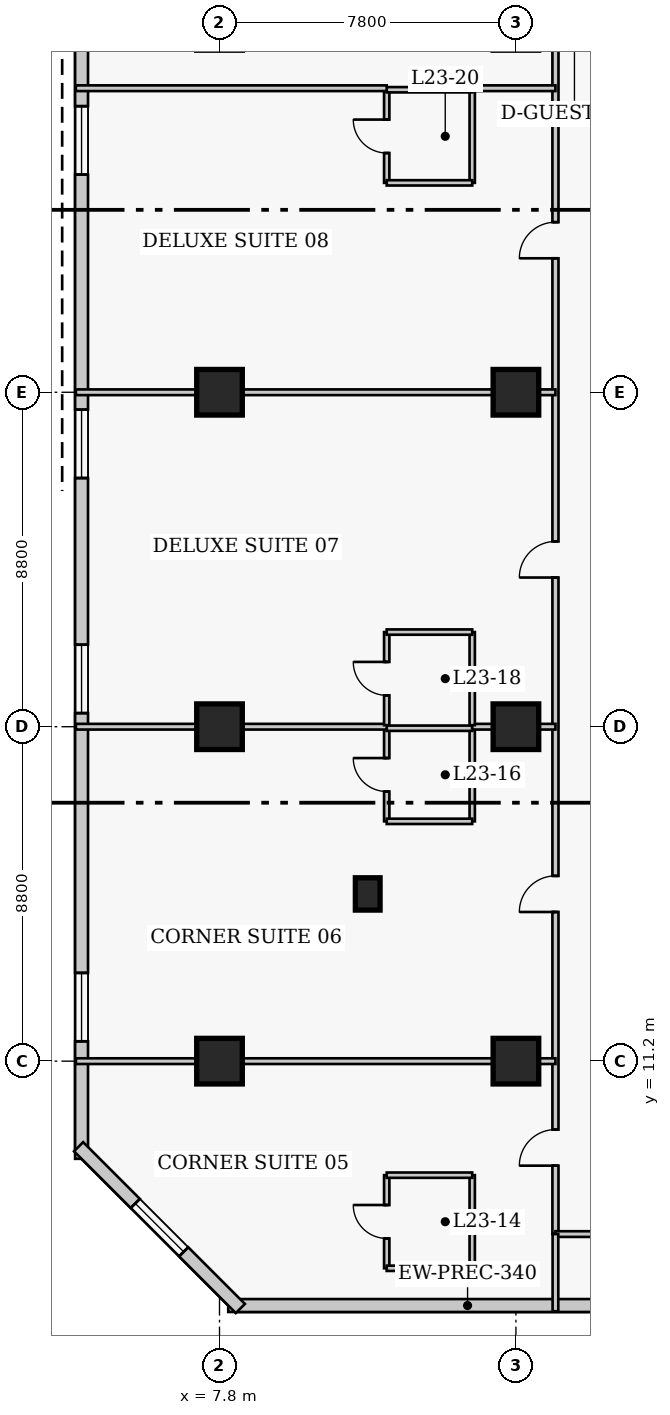
"""IFC4 building model, lengths in metres.
Left out: names, types, materials, properties, quantities, classifications, styles, units other than length and angle.
Written with IfcOpenShell. Run it as: python <this file> out.ifc"""

import sys

from ifc_helpers import new_model, si_unit, direction, frame, frame_2d, origin, origin_2d, place, context, subcontext, project, spatial, rectangle, extrude, element, fill, save


model = new_model("IFC4")
c1 = context("Model", 3, precision=1e-05, world=origin(), true_north=direction((0.0, 1.0)))
c2 = subcontext(c1, "Body", "Model", "MODEL_VIEW")
j1 = project(units=[si_unit("LENGTHUNIT", "METRE"), si_unit("PLANEANGLEUNIT", "RADIAN")], contexts=[c1])
p1 = place(None, origin())
s1 = spatial("IfcSite", under=j1, at=p1, CompositionType="ELEMENT")
p2 = place(p1, origin())
s2 = spatial("IfcBuilding", under=s1, at=p2, CompositionType="ELEMENT")
p3 = place(p2, frame((0.0, 0.0, 95.6)))
s3 = spatial("IfcBuildingStorey", under=s2, at=p3, CompositionType="ELEMENT", Elevation=95.6)
for number, where, z_axis, x_axis in (
    (1, (7.8, 11.2, 0.0), (0.0, 0.0, 1.0), (1.0, 0.0, 0.0)),
    (2, (7.8, 20.0, 0.0), (0.0, 0.0, 1.0), (1.0, 0.0, 0.0)),
    (3, (7.8, 28.8, 0.0), (0.0, 0.0, 1.0), (1.0, 0.0, 0.0)),
    (4, (15.6, 11.2, 0.0), (0.0, 0.0, 1.0), (1.0, 0.0, 0.0)),
    (5, (15.6, 20.0, 0.0), (0.0, 0.0, 1.0), (1.0, 0.0, 0.0)),
    (6, (15.6, 28.8, 0.0), (0.0, 0.0, 1.0), (1.0, 0.0, 0.0)),
):
    element("IfcColumn", number, at=place(p3, frame(where, z_axis=z_axis, x_axis=x_axis)), inside=s3, PredefinedType="COLUMN", context=c2, shape_type="SweptSolid", body=[
        extrude(rectangle(XDim=1.2, YDim=1.2, at=origin_2d()), origin(), (0.0, 0.0, 1.0), 3.8),
    ])
p4 = place(p3, frame((11.7, 15.6, 0.0), z_axis=(0.0, 0.0, 1.0), x_axis=(1.0, 0.0, 0.0)))
e7 = element("IfcColumn", 7, at=p4, inside=s3, PredefinedType="PILASTER", context=c2, shape_type="SweptSolid", body=[
    extrude(rectangle(XDim=0.65, YDim=0.85, at=origin_2d()), origin(), (0.0, 0.0, 1.0), 3.8),
])
p5 = place(p3, frame((8.03, 4.77, 0.0), z_axis=(0.0, 0.0, 1.0), x_axis=(1.0, 0.0, 0.0)))
e8 = element("IfcWall", 8, at=p5, inside=s3, PredefinedType="SOLIDWALL", context=c2, shape_type="SweptSolid", body=[
    extrude(rectangle(XDim=28.29, YDim=0.34, at=frame_2d((14.145, 0.0))), origin(), (0.0, 0.0, 1.0), 3.54),
])
p6 = place(p5, frame((18.57, 0.0, 0.0)))
e9 = element("IfcOpeningElement", 9, at=p6, cuts=e8, PredefinedType="OPENING", context=c2, shape_type="SweptSolid", body=[
    extrude(rectangle(XDim=1.4, YDim=2.15, at=frame_2d((0.7, 1.075))), frame((0.0, 0.18, 0.0), z_axis=(0.0, -1.0, 0.0), x_axis=(1.0, 0.0, 0.0)), (0.0, 0.0, 1.0), 0.36),
])
p7 = place(p5, frame((12.595, 0.0, 0.85)))
e10 = element("IfcOpeningElement", 10, at=p7, cuts=e8, PredefinedType="OPENING", context=c2, shape_type="SweptSolid", body=[
    extrude(rectangle(XDim=1.8, YDim=1.8, at=frame_2d((0.9, 0.9))), frame((0.0, 0.18, 0.0), z_axis=(0.0, -1.0, 0.0), x_axis=(1.0, 0.0, 0.0)), (0.0, 0.0, 1.0), 0.36),
])
p8 = place(p3, frame((4.17, 40.57, 0.0), z_axis=(0.0, 0.0, 1.0), x_axis=(0.0, -1.0, 0.0)))
e11 = element("IfcWall", 11, at=p8, inside=s3, PredefinedType="SOLIDWALL", context=c2, shape_type="SweptSolid", body=[
    extrude(rectangle(XDim=31.94, YDim=0.34, at=frame_2d((15.97, 0.0))), origin(), (0.0, 0.0, 1.0), 3.54),
])
p9 = place(p8, frame((4.242, 0.0, 0.85)))
e12 = element("IfcOpeningElement", 12, at=p9, cuts=e11, PredefinedType="OPENING", context=c2, shape_type="SweptSolid", body=[
    extrude(rectangle(XDim=1.8, YDim=1.8, at=frame_2d((0.9, 0.9))), frame((0.0, 0.18, 0.0), z_axis=(0.0, -1.0, 0.0), x_axis=(1.0, 0.0, 0.0)), (0.0, 0.0, 1.0), 0.36),
])
p10 = place(p8, frame((12.228, 0.0, 0.85)))
e13 = element("IfcOpeningElement", 13, at=p10, cuts=e11, PredefinedType="OPENING", context=c2, shape_type="SweptSolid", body=[
    extrude(rectangle(XDim=1.8, YDim=1.8, at=frame_2d((0.9, 0.9))), frame((0.0, 0.18, 0.0), z_axis=(0.0, -1.0, 0.0), x_axis=(1.0, 0.0, 0.0)), (0.0, 0.0, 1.0), 0.36),
])
p11 = place(p8, frame((18.413, 0.0, 0.85)))
e14 = element("IfcOpeningElement", 14, at=p11, cuts=e11, PredefinedType="OPENING", context=c2, shape_type="SweptSolid", body=[
    extrude(rectangle(XDim=1.8, YDim=1.8, at=frame_2d((0.9, 0.9))), frame((0.0, 0.18, 0.0), z_axis=(0.0, -1.0, 0.0), x_axis=(1.0, 0.0, 0.0)), (0.0, 0.0, 1.0), 0.36),
])
p12 = place(p8, frame((27.048, 0.0, 0.85)))
e15 = element("IfcOpeningElement", 15, at=p12, cuts=e11, PredefinedType="OPENING", context=c2, shape_type="SweptSolid", body=[
    extrude(rectangle(XDim=1.8, YDim=1.8, at=frame_2d((0.9, 0.9))), frame((0.0, 0.18, 0.0), z_axis=(0.0, -1.0, 0.0), x_axis=(1.0, 0.0, 0.0)), (0.0, 0.0, 1.0), 0.36),
])
p13 = place(p3, frame((4.092, 8.948, 0.0), z_axis=(0.0, 0.0, 1.0), x_axis=(0.707106781187, -0.707106781187, 0.0)))
e16 = element("IfcWall", 16, at=p13, inside=s3, PredefinedType="SOLIDWALL", context=c2, shape_type="SweptSolid", body=[
    extrude(rectangle(XDim=6.02, YDim=0.34, at=frame_2d((3.01, 0.0))), origin(), (0.0, 0.0, 1.0), 3.54),
])
p14 = place(p13, frame((2.11, 0.0, 0.85)))
e17 = element("IfcOpeningElement", 17, at=p14, cuts=e16, PredefinedType="OPENING", context=c2, shape_type="SweptSolid", body=[
    extrude(rectangle(XDim=1.8, YDim=1.8, at=frame_2d((0.9, 0.9))), frame((0.0, 0.18, 0.0), z_axis=(0.0, -1.0, 0.0), x_axis=(1.0, 0.0, 0.0)), (0.0, 0.0, 1.0), 0.36),
])
p15 = place(p3, frame((16.64, 6.65, 0.0), z_axis=(0.0, 0.0, 1.0), x_axis=(0.0, 1.0, 0.0)))
e18 = element("IfcWall", 18, at=p15, inside=s3, PredefinedType="PARTITIONING", context=c2, shape_type="SweptSolid", body=[
    extrude(rectangle(XDim=34.0, YDim=0.16, at=frame_2d((17.0, 0.0))), origin(), (0.0, 0.0, 1.0), 3.54),
])
p16 = place(p15, frame((1.8, 0.0, 0.0)))
e19 = element("IfcOpeningElement", 19, at=p16, cuts=e18, PredefinedType="OPENING", context=c2, shape_type="SweptSolid", body=[
    extrude(rectangle(XDim=0.95, YDim=2.1, at=frame_2d((0.475, 1.05))), frame((0.0, 0.09, 0.0), z_axis=(0.0, -1.0, 0.0), x_axis=(1.0, 0.0, 0.0)), (0.0, 0.0, 1.0), 0.18),
])
p17 = place(p15, frame((8.475, 0.0, 0.0)))
e20 = element("IfcOpeningElement", 20, at=p17, cuts=e18, PredefinedType="OPENING", context=c2, shape_type="SweptSolid", body=[
    extrude(rectangle(XDim=0.95, YDim=2.1, at=frame_2d((0.475, 1.05))), frame((0.0, 0.09, 0.0), z_axis=(0.0, -1.0, 0.0), x_axis=(1.0, 0.0, 0.0)), (0.0, 0.0, 1.0), 0.18),
])
p18 = place(p15, frame((17.275, 0.0, 0.0)))
e21 = element("IfcOpeningElement", 21, at=p18, cuts=e18, PredefinedType="OPENING", context=c2, shape_type="SweptSolid", body=[
    extrude(rectangle(XDim=0.95, YDim=2.1, at=frame_2d((0.475, 1.05))), frame((0.0, 0.09, 0.0), z_axis=(0.0, -1.0, 0.0), x_axis=(1.0, 0.0, 0.0)), (0.0, 0.0, 1.0), 0.18),
])
p19 = place(p15, frame((25.675, 0.0, 0.0)))
e22 = element("IfcOpeningElement", 22, at=p19, cuts=e18, PredefinedType="OPENING", context=c2, shape_type="SweptSolid", body=[
    extrude(rectangle(XDim=0.95, YDim=2.1, at=frame_2d((0.475, 1.05))), frame((0.0, 0.09, 0.0), z_axis=(0.0, -1.0, 0.0), x_axis=(1.0, 0.0, 0.0)), (0.0, 0.0, 1.0), 0.18),
])
p20 = place(p15, frame((32.56, 0.0, 0.0)))
e23 = element("IfcOpeningElement", 23, at=p20, cuts=e18, PredefinedType="OPENING", context=c2, shape_type="SweptSolid", body=[
    extrude(rectangle(XDim=1.0, YDim=2.15, at=frame_2d((0.5, 1.075))), frame((0.0, 0.09, 0.0), z_axis=(0.0, -1.0, 0.0), x_axis=(1.0, 0.0, 0.0)), (0.0, 0.0, 1.0), 0.18),
])
p21 = place(p3, frame((16.64, 6.65, 0.0), z_axis=(0.0, 0.0, 1.0), x_axis=(1.0, 0.0, 0.0)))
e24 = element("IfcWall", 24, at=p21, inside=s3, PredefinedType="PARTITIONING", context=c2, shape_type="SweptSolid", body=[
    extrude(rectangle(XDim=2.22, YDim=0.15, at=frame_2d((1.11, 0.0))), origin(), (0.0, 0.0, 1.0), 3.54),
])
p22 = place(p3, frame((16.64, 4.62, 0.0), z_axis=(0.0, 0.0, 1.0), x_axis=(0.0, 1.0, 0.0)))
e25 = element("IfcWall", 25, at=p22, inside=s3, PredefinedType="PARTITIONING", context=c2, shape_type="SweptSolid", body=[
    extrude(rectangle(XDim=2.03, YDim=0.15, at=frame_2d((1.015, 0.0))), origin(), (0.0, 0.0, 1.0), 3.54),
])
p23 = place(p3, frame((12.2, 5.75, 0.0), z_axis=(0.0, 0.0, 1.0), x_axis=(0.0, 1.0, 0.0)))
e26 = element("IfcWall", 26, at=p23, inside=s3, PredefinedType="PLUMBINGWALL", context=c2, shape_type="SweptSolid", body=[
    extrude(rectangle(XDim=2.45, YDim=0.14, at=frame_2d((1.225, 0.0))), origin(), (0.0, 0.0, 1.0), 3.54),
])
p24 = place(p23, frame((0.785, 0.0, 0.0)))
e27 = element("IfcOpeningElement", 27, at=p24, cuts=e26, PredefinedType="OPENING", context=c2, shape_type="SweptSolid", body=[
    extrude(rectangle(XDim=0.88, YDim=2.05, at=frame_2d((0.44, 1.025))), frame((0.0, 0.08, 0.0), z_axis=(0.0, -1.0, 0.0), x_axis=(1.0, 0.0, 0.0)), (0.0, 0.0, 1.0), 0.16),
])
p25 = place(p3, frame((14.45, 5.75, 0.0), z_axis=(0.0, 0.0, 1.0), x_axis=(0.0, 1.0, 0.0)))
e28 = element("IfcWall", 28, at=p25, inside=s3, PredefinedType="PLUMBINGWALL", context=c2, shape_type="SweptSolid", body=[
    extrude(rectangle(XDim=2.45, YDim=0.14, at=frame_2d((1.225, 0.0))), origin(), (0.0, 0.0, 1.0), 3.54),
])
for number, where, z_axis, x_axis in (
    (29, (12.2, 5.75, 0.0), (0.0, 0.0, 1.0), (1.0, 0.0, 0.0)),
    (30, (12.2, 8.2, 0.0), (0.0, 0.0, 1.0), (1.0, 0.0, 0.0)),
):
    element("IfcWall", number, at=place(p3, frame(where, z_axis=z_axis, x_axis=x_axis)), inside=s3, PredefinedType="PLUMBINGWALL", context=c2, shape_type="SweptSolid", body=[
        extrude(rectangle(XDim=2.25, YDim=0.14, at=frame_2d((1.125, 0.0))), origin(), (0.0, 0.0, 1.0), 3.54),
    ])
p26 = place(p3, frame((4.02, 11.2, 0.0), z_axis=(0.0, 0.0, 1.0), x_axis=(1.0, 0.0, 0.0)))
e31 = element("IfcWall", 31, at=p26, inside=s3, PredefinedType="PARTITIONING", context=c2, shape_type="SweptSolid", body=[
    extrude(rectangle(XDim=12.62, YDim=0.15, at=frame_2d((6.31, 0.0))), origin(), (0.0, 0.0, 1.0), 2.679),
])
p27 = place(p3, frame((12.2, 17.51, 0.0), z_axis=(0.0, 0.0, 1.0), x_axis=(0.0, 1.0, 0.0)))
e32 = element("IfcWall", 32, at=p27, inside=s3, PredefinedType="PLUMBINGWALL", context=c2, shape_type="SweptSolid", body=[
    extrude(rectangle(XDim=2.45, YDim=0.14, at=frame_2d((1.225, 0.0))), origin(), (0.0, 0.0, 1.0), 3.54),
])
p28 = place(p27, frame((0.785, 0.0, 0.0)))
e33 = element("IfcOpeningElement", 33, at=p28, cuts=e32, PredefinedType="OPENING", context=c2, shape_type="SweptSolid", body=[
    extrude(rectangle(XDim=0.88, YDim=2.05, at=frame_2d((0.44, 1.025))), frame((0.0, 0.08, 0.0), z_axis=(0.0, -1.0, 0.0), x_axis=(1.0, 0.0, 0.0)), (0.0, 0.0, 1.0), 0.16),
])
p29 = place(p3, frame((14.45, 17.51, 0.0), z_axis=(0.0, 0.0, 1.0), x_axis=(0.0, 1.0, 0.0)))
e34 = element("IfcWall", 34, at=p29, inside=s3, PredefinedType="PLUMBINGWALL", context=c2, shape_type="SweptSolid", body=[
    extrude(rectangle(XDim=2.45, YDim=0.14, at=frame_2d((1.225, 0.0))), origin(), (0.0, 0.0, 1.0), 3.54),
])
p30 = place(p3, frame((12.2, 17.51, 0.0), z_axis=(0.0, 0.0, 1.0), x_axis=(1.0, 0.0, 0.0)))
e35 = element("IfcWall", 35, at=p30, inside=s3, PredefinedType="PLUMBINGWALL", context=c2, shape_type="SweptSolid", body=[
    extrude(rectangle(XDim=2.25, YDim=0.14, at=frame_2d((1.125, 0.0))), origin(), (0.0, 0.0, 1.0), 3.54),
])
p31 = place(p3, frame((12.2, 19.96, 0.0), z_axis=(0.0, 0.0, 1.0), x_axis=(1.0, 0.0, 0.0)))
e36 = element("IfcWall", 36, at=p31, inside=s3, PredefinedType="PLUMBINGWALL", context=c2, shape_type="SweptSolid", body=[
    extrude(rectangle(XDim=2.25, YDim=0.14, at=frame_2d((1.125, 0.0))), origin(), (0.0, 0.0, 1.0), 2.679),
])
p32 = place(p3, frame((4.02, 20.0, 0.0), z_axis=(0.0, 0.0, 1.0), x_axis=(1.0, 0.0, 0.0)))
e37 = element("IfcWall", 37, at=p32, inside=s3, PredefinedType="PARTITIONING", context=c2, shape_type="SweptSolid", body=[
    extrude(rectangle(XDim=8.18, YDim=0.15, at=frame_2d((4.09, 0.0))), origin(), (0.0, 0.0, 1.0), 2.679),
])
p33 = place(p3, frame((14.45, 20.0, 0.0), z_axis=(0.0, 0.0, 1.0), x_axis=(1.0, 0.0, 0.0)))
e38 = element("IfcWall", 38, at=p33, inside=s3, PredefinedType="PARTITIONING", context=c2, shape_type="SweptSolid", body=[
    extrude(rectangle(XDim=2.19, YDim=0.15, at=frame_2d((1.095, 0.0))), origin(), (0.0, 0.0, 1.0), 2.679),
])
p34 = place(p3, frame((12.2, 20.04, 0.0), z_axis=(0.0, 0.0, 1.0), x_axis=(0.0, 1.0, 0.0)))
e39 = element("IfcWall", 39, at=p34, inside=s3, PredefinedType="PLUMBINGWALL", context=c2, shape_type="SweptSolid", body=[
    extrude(rectangle(XDim=2.45, YDim=0.14, at=frame_2d((1.225, 0.0))), origin(), (0.0, 0.0, 1.0), 3.54),
])
p35 = place(p34, frame((0.785, 0.0, 0.0)))
e40 = element("IfcOpeningElement", 40, at=p35, cuts=e39, PredefinedType="OPENING", context=c2, shape_type="SweptSolid", body=[
    extrude(rectangle(XDim=0.88, YDim=2.05, at=frame_2d((0.44, 1.025))), frame((0.0, 0.08, 0.0), z_axis=(0.0, -1.0, 0.0), x_axis=(1.0, 0.0, 0.0)), (0.0, 0.0, 1.0), 0.16),
])
p36 = place(p3, frame((14.45, 20.04, 0.0), z_axis=(0.0, 0.0, 1.0), x_axis=(0.0, 1.0, 0.0)))
e41 = element("IfcWall", 41, at=p36, inside=s3, PredefinedType="PLUMBINGWALL", context=c2, shape_type="SweptSolid", body=[
    extrude(rectangle(XDim=2.45, YDim=0.14, at=frame_2d((1.225, 0.0))), origin(), (0.0, 0.0, 1.0), 3.54),
])
p37 = place(p3, frame((12.2, 22.49, 0.0), z_axis=(0.0, 0.0, 1.0), x_axis=(1.0, 0.0, 0.0)))
e42 = element("IfcWall", 42, at=p37, inside=s3, PredefinedType="PLUMBINGWALL", context=c2, shape_type="SweptSolid", body=[
    extrude(rectangle(XDim=2.25, YDim=0.14, at=frame_2d((1.125, 0.0))), origin(), (0.0, 0.0, 1.0), 3.54),
])
p38 = place(p3, frame((4.02, 28.8, 0.0), z_axis=(0.0, 0.0, 1.0), x_axis=(1.0, 0.0, 0.0)))
e43 = element("IfcWall", 43, at=p38, inside=s3, PredefinedType="PARTITIONING", context=c2, shape_type="SweptSolid", body=[
    extrude(rectangle(XDim=12.62, YDim=0.15, at=frame_2d((6.31, 0.0))), origin(), (0.0, 0.0, 1.0), 2.679),
])
p39 = place(p3, frame((12.2, 34.31, 0.0), z_axis=(0.0, 0.0, 1.0), x_axis=(0.0, 1.0, 0.0)))
e44 = element("IfcWall", 44, at=p39, inside=s3, PredefinedType="PLUMBINGWALL", context=c2, shape_type="SweptSolid", body=[
    extrude(rectangle(XDim=2.45, YDim=0.14, at=frame_2d((1.225, 0.0))), origin(), (0.0, 0.0, 1.0), 3.54),
])
p40 = place(p39, frame((0.785, 0.0, 0.0)))
e45 = element("IfcOpeningElement", 45, at=p40, cuts=e44, PredefinedType="OPENING", context=c2, shape_type="SweptSolid", body=[
    extrude(rectangle(XDim=0.88, YDim=2.05, at=frame_2d((0.44, 1.025))), frame((0.0, 0.08, 0.0), z_axis=(0.0, -1.0, 0.0), x_axis=(1.0, 0.0, 0.0)), (0.0, 0.0, 1.0), 0.16),
])
p41 = place(p3, frame((14.45, 34.31, 0.0), z_axis=(0.0, 0.0, 1.0), x_axis=(0.0, 1.0, 0.0)))
e46 = element("IfcWall", 46, at=p41, inside=s3, PredefinedType="PLUMBINGWALL", context=c2, shape_type="SweptSolid", body=[
    extrude(rectangle(XDim=2.45, YDim=0.14, at=frame_2d((1.225, 0.0))), origin(), (0.0, 0.0, 1.0), 3.54),
])
for number, where, z_axis, x_axis in (
    (47, (12.2, 34.31, 0.0), (0.0, 0.0, 1.0), (1.0, 0.0, 0.0)),
    (48, (12.2, 36.76, 0.0), (0.0, 0.0, 1.0), (1.0, 0.0, 0.0)),
):
    element("IfcWall", number, at=place(p3, frame(where, z_axis=z_axis, x_axis=x_axis)), inside=s3, PredefinedType="PLUMBINGWALL", context=c2, shape_type="SweptSolid", body=[
        extrude(rectangle(XDim=2.25, YDim=0.14, at=frame_2d((1.125, 0.0))), origin(), (0.0, 0.0, 1.0), 3.54),
    ])
p42 = place(p3, frame((4.02, 36.8, 0.0), z_axis=(0.0, 0.0, 1.0), x_axis=(1.0, 0.0, 0.0)))
e49 = element("IfcWall", 49, at=p42, inside=s3, PredefinedType="PARTITIONING", context=c2, shape_type="SweptSolid", body=[
    extrude(rectangle(XDim=8.18, YDim=0.15, at=frame_2d((4.09, 0.0))), origin(), (0.0, 0.0, 1.0), 3.54),
])
p43 = place(p3, frame((14.45, 36.8, 0.0), z_axis=(0.0, 0.0, 1.0), x_axis=(1.0, 0.0, 0.0)))
e50 = element("IfcWall", 50, at=p43, inside=s3, PredefinedType="PARTITIONING", context=c2, shape_type="SweptSolid", body=[
    extrude(rectangle(XDim=2.19, YDim=0.15, at=frame_2d((1.095, 0.0))), origin(), (0.0, 0.0, 1.0), 3.54),
])
p44 = place(p9, origin())
e51 = element("IfcWindow", 51, at=p44, inside=s3, PartitioningType="SINGLE_PANEL", PredefinedType="WINDOW", context=c2, shape_type="SweptSolid", body=[
    extrude(rectangle(XDim=1.8, YDim=1.8, at=frame_2d((0.9, 0.9))), frame((0.0, 0.03, 0.0), z_axis=(0.0, -1.0, 0.0), x_axis=(1.0, 0.0, 0.0)), (0.0, 0.0, 1.0), 0.06),
])
fill(e12, e51)
p45 = place(p10, origin())
e52 = element("IfcWindow", 52, at=p45, inside=s3, PartitioningType="SINGLE_PANEL", PredefinedType="WINDOW", context=c2, shape_type="SweptSolid", body=[
    extrude(rectangle(XDim=1.8, YDim=1.8, at=frame_2d((0.9, 0.9))), frame((0.0, 0.03, 0.0), z_axis=(0.0, -1.0, 0.0), x_axis=(1.0, 0.0, 0.0)), (0.0, 0.0, 1.0), 0.06),
])
fill(e13, e52)
p46 = place(p11, origin())
e53 = element("IfcWindow", 53, at=p46, inside=s3, PartitioningType="SINGLE_PANEL", PredefinedType="WINDOW", context=c2, shape_type="SweptSolid", body=[
    extrude(rectangle(XDim=1.8, YDim=1.8, at=frame_2d((0.9, 0.9))), frame((0.0, 0.03, 0.0), z_axis=(0.0, -1.0, 0.0), x_axis=(1.0, 0.0, 0.0)), (0.0, 0.0, 1.0), 0.06),
])
fill(e14, e53)
p47 = place(p12, origin())
e54 = element("IfcWindow", 54, at=p47, inside=s3, PartitioningType="SINGLE_PANEL", PredefinedType="WINDOW", context=c2, shape_type="SweptSolid", body=[
    extrude(rectangle(XDim=1.8, YDim=1.8, at=frame_2d((0.9, 0.9))), frame((0.0, 0.03, 0.0), z_axis=(0.0, -1.0, 0.0), x_axis=(1.0, 0.0, 0.0)), (0.0, 0.0, 1.0), 0.06),
])
fill(e15, e54)
p48 = place(p14, origin())
e55 = element("IfcWindow", 55, at=p48, inside=s3, PartitioningType="SINGLE_PANEL", PredefinedType="WINDOW", context=c2, shape_type="SweptSolid", body=[
    extrude(rectangle(XDim=1.8, YDim=1.8, at=frame_2d((0.9, 0.9))), frame((0.0, 0.03, 0.0), z_axis=(0.0, -1.0, 0.0), x_axis=(1.0, 0.0, 0.0)), (0.0, 0.0, 1.0), 0.06),
])
fill(e17, e55)
p49 = place(p24, origin())
e56 = element("IfcDoor", 56, at=p49, inside=s3, OperationType="SINGLE_SWING_RIGHT", PredefinedType="DOOR", context=c2, shape_type="SweptSolid", body=[
    extrude(rectangle(XDim=0.88, YDim=2.05, at=frame_2d((0.44, 1.025))), frame((0.0, 0.025, 0.0), z_axis=(0.0, -1.0, 0.0), x_axis=(1.0, 0.0, 0.0)), (0.0, 0.0, 1.0), 0.05),
])
fill(e27, e56)
p50 = place(p16, origin())
e57 = element("IfcDoor", 57, at=p50, inside=s3, OperationType="SINGLE_SWING_LEFT", PredefinedType="DOOR", context=c2, shape_type="SweptSolid", body=[
    extrude(rectangle(XDim=0.95, YDim=2.1, at=frame_2d((0.475, 1.05))), frame((0.0, 0.025, 0.0), z_axis=(0.0, -1.0, 0.0), x_axis=(1.0, 0.0, 0.0)), (0.0, 0.0, 1.0), 0.05),
])
fill(e19, e57)
p51 = place(p28, origin())
e58 = element("IfcDoor", 58, at=p51, inside=s3, OperationType="SINGLE_SWING_RIGHT", PredefinedType="DOOR", context=c2, shape_type="SweptSolid", body=[
    extrude(rectangle(XDim=0.88, YDim=2.05, at=frame_2d((0.44, 1.025))), frame((0.0, 0.025, 0.0), z_axis=(0.0, -1.0, 0.0), x_axis=(1.0, 0.0, 0.0)), (0.0, 0.0, 1.0), 0.05),
])
fill(e33, e58)
p52 = place(p17, origin())
e59 = element("IfcDoor", 59, at=p52, inside=s3, OperationType="SINGLE_SWING_LEFT", PredefinedType="DOOR", context=c2, shape_type="SweptSolid", body=[
    extrude(rectangle(XDim=0.95, YDim=2.1, at=frame_2d((0.475, 1.05))), frame((0.0, 0.025, 0.0), z_axis=(0.0, -1.0, 0.0), x_axis=(1.0, 0.0, 0.0)), (0.0, 0.0, 1.0), 0.05),
])
fill(e20, e59)
p53 = place(p35, origin())
e60 = element("IfcDoor", 60, at=p53, inside=s3, OperationType="SINGLE_SWING_RIGHT", PredefinedType="DOOR", context=c2, shape_type="SweptSolid", body=[
    extrude(rectangle(XDim=0.88, YDim=2.05, at=frame_2d((0.44, 1.025))), frame((0.0, 0.025, 0.0), z_axis=(0.0, -1.0, 0.0), x_axis=(1.0, 0.0, 0.0)), (0.0, 0.0, 1.0), 0.05),
])
fill(e40, e60)
p54 = place(p18, origin())
e61 = element("IfcDoor", 61, at=p54, inside=s3, OperationType="SINGLE_SWING_LEFT", PredefinedType="DOOR", context=c2, shape_type="SweptSolid", body=[
    extrude(rectangle(XDim=0.95, YDim=2.1, at=frame_2d((0.475, 1.05))), frame((0.0, 0.025, 0.0), z_axis=(0.0, -1.0, 0.0), x_axis=(1.0, 0.0, 0.0)), (0.0, 0.0, 1.0), 0.05),
])
fill(e21, e61)
p55 = place(p40, origin())
e62 = element("IfcDoor", 62, at=p55, inside=s3, OperationType="SINGLE_SWING_RIGHT", PredefinedType="DOOR", context=c2, shape_type="SweptSolid", body=[
    extrude(rectangle(XDim=0.88, YDim=2.05, at=frame_2d((0.44, 1.025))), frame((0.0, 0.025, 0.0), z_axis=(0.0, -1.0, 0.0), x_axis=(1.0, 0.0, 0.0)), (0.0, 0.0, 1.0), 0.05),
])
fill(e45, e62)
p56 = place(p19, origin())
e63 = element("IfcDoor", 63, at=p56, inside=s3, OperationType="SINGLE_SWING_LEFT", PredefinedType="DOOR", context=c2, shape_type="SweptSolid", body=[
    extrude(rectangle(XDim=0.95, YDim=2.1, at=frame_2d((0.475, 1.05))), frame((0.0, 0.025, 0.0), z_axis=(0.0, -1.0, 0.0), x_axis=(1.0, 0.0, 0.0)), (0.0, 0.0, 1.0), 0.05),
])
fill(e22, e63)
save(model, sys.argv[1])
